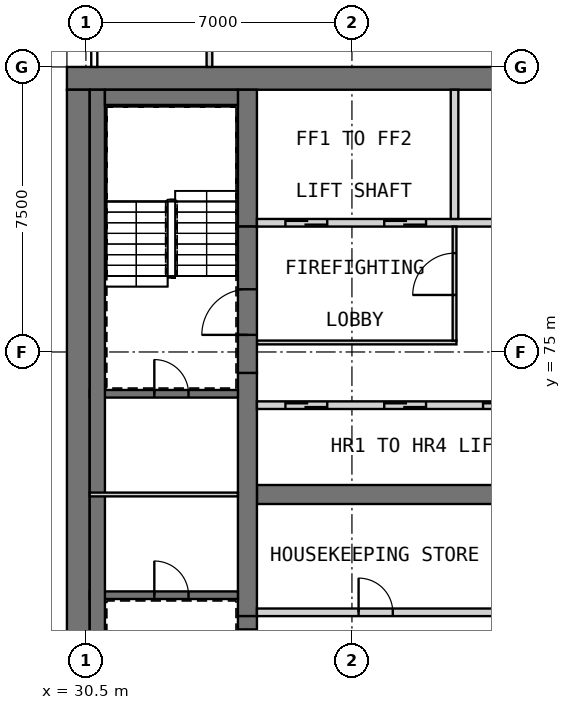
"""IFC4 building model, lengths in metres.
Left out: names, types, materials, properties, quantities, classifications, styles, units other than length and angle.
Written with IfcOpenShell. Run it as: python <this file> out.ifc"""

import sys

from ifc_helpers import new_model, si_unit, direction, frame, frame_2d, origin, place, context, subcontext, project, spatial, rectangle, extrude, element, fill, save


model = new_model("IFC4")
c1 = context("Model", 3, precision=1e-05, world=origin(), true_north=direction((0.0, 1.0)))
c2 = subcontext(c1, "Body", "Model", "MODEL_VIEW")
j1 = project(units=[si_unit("LENGTHUNIT", "METRE"), si_unit("PLANEANGLEUNIT", "RADIAN")], contexts=[c1])
p1 = place(None, origin())
s1 = spatial("IfcSite", under=j1, at=p1, CompositionType="ELEMENT")
p2 = place(p1, origin())
s2 = spatial("IfcBuilding", under=s1, at=p2, CompositionType="ELEMENT")
p3 = place(p2, frame((0.0, 0.0, 292.2)))
s3 = spatial("IfcBuildingStorey", under=s2, at=p3, CompositionType="ELEMENT", Elevation=292.2)
p4 = place(p3, frame((30.0, 82.2, 0.0), z_axis=(0.0, 0.0, 1.0), x_axis=(1.0, 0.0, 0.0)))
e1 = element("IfcWall", 1, at=p4, inside=s3, PredefinedType="SHEAR", context=c2, shape_type="SweptSolid", body=[
    extrude(rectangle(XDim=30.0, YDim=0.6, at=frame_2d((15.0, 0.0))), origin(), (0.0, 0.0, 1.0), 5.5),
])
p5 = place(p3, frame((30.3, 60.6, 0.0), z_axis=(0.0, 0.0, 1.0), x_axis=(0.0, 1.0, 0.0)))
e2 = element("IfcWall", 2, at=p5, inside=s3, PredefinedType="SHEAR", context=c2, shape_type="SweptSolid", body=[
    extrude(rectangle(XDim=21.3, YDim=0.6, at=frame_2d((10.65, 0.0))), origin(), (0.0, 0.0, 1.0), 5.5),
])
p6 = place(p3, frame((35.0, 71.25, 0.0), z_axis=(0.0, 0.0, 1.0), x_axis=(1.0, 0.0, 0.0)))
e3 = element("IfcWall", 3, at=p6, inside=s3, PredefinedType="SHEAR", context=c2, shape_type="SweptSolid", body=[
    extrude(rectangle(XDim=15.6, YDim=0.5, at=frame_2d((7.8, 0.0))), origin(), (0.0, 0.0, 1.0), 5.5),
])
p7 = place(p3, frame((34.75, 68.05, 0.0), z_axis=(0.0, 0.0, 1.0), x_axis=(0.0, 1.0, 0.0)))
e4 = element("IfcWall", 4, at=p7, inside=s3, PredefinedType="SHEAR", context=c2, shape_type="SweptSolid", body=[
    extrude(rectangle(XDim=6.4, YDim=0.5, at=frame_2d((3.2, 0.0))), origin(), (0.0, 0.0, 1.0), 5.5),
])
p8 = place(p3, frame((34.75, 78.3, 0.0), z_axis=(0.0, 0.0, 1.0), x_axis=(0.0, 1.0, 0.0)))
e5 = element("IfcWall", 5, at=p8, inside=s3, PredefinedType="SHEAR", context=c2, shape_type="SweptSolid", body=[
    extrude(rectangle(XDim=3.6, YDim=0.5, at=frame_2d((1.8, 0.0))), origin(), (0.0, 0.0, 1.0), 5.5),
])
p9 = place(p2, frame((0.0, 0.0, 34.0)))
s4 = spatial("IfcBuildingStorey", under=s2, at=p9, CompositionType="ELEMENT", Elevation=34.0)
for number, where, z_axis, x_axis in (
    (6, (29.7, 70.8, 0.0), (0.0, 0.0, 1.0), (0.0, 1.0, 0.0)),
    (7, (29.7, 75.675, 0.0), (0.0, 0.0, 1.0), (0.0, 1.0, 0.0)),
    (8, (29.7, 80.55, 0.0), (0.0, 0.0, 1.0), (0.0, 1.0, 0.0)),
):
    element("IfcWall", number, at=place(p9, frame(where, z_axis=z_axis, x_axis=x_axis)), inside=s4, PredefinedType="SOLIDWALL", context=c2, shape_type="SweptSolid", body=[
        extrude(rectangle(XDim=0.9, YDim=0.6, at=frame_2d((0.45, 0.0))), origin(), (0.0, 0.0, 1.0), 286.2),
    ])
p10 = place(p3, frame((35.0, 68.15, 0.0), z_axis=(0.0, 0.0, 1.0), x_axis=(1.0, 0.0, 0.0)))
e9 = element("IfcWall", 9, at=p10, inside=s3, PredefinedType="PARTITIONING", context=c2, shape_type="SweptSolid", body=[
    extrude(rectangle(XDim=15.6, YDim=0.2, at=frame_2d((7.8, 0.0))), origin(), (0.0, 0.0, 1.0), 5.2),
])
p11 = place(p10, frame((2.675, 0.0, 0.0)))
e10 = element("IfcOpeningElement", 10, at=p11, cuts=e9, PredefinedType="OPENING", context=c2, shape_type="SweptSolid", body=[
    extrude(rectangle(XDim=0.9, YDim=2.1, at=frame_2d((0.45, 1.05))), frame((0.0, 0.11, 0.0), z_axis=(0.0, -1.0, 0.0), x_axis=(1.0, 0.0, 0.0)), (0.0, 0.0, 1.0), 0.22),
])
p12 = place(p10, frame((10.475, 0.0, 0.0)))
e11 = element("IfcOpeningElement", 11, at=p12, cuts=e9, PredefinedType="OPENING", context=c2, shape_type="SweptSolid", body=[
    extrude(rectangle(XDim=0.9, YDim=2.1, at=frame_2d((0.45, 1.05))), frame((0.0, 0.11, 0.0), z_axis=(0.0, -1.0, 0.0), x_axis=(1.0, 0.0, 0.0)), (0.0, 0.0, 1.0), 0.22),
])
p13 = place(p3, frame((35.0, 73.6, 0.0), z_axis=(0.0, 0.0, 1.0), x_axis=(1.0, 0.0, 0.0)))
e12 = element("IfcWall", 12, at=p13, inside=s3, PredefinedType="SOLIDWALL", context=c2, shape_type="SweptSolid", body=[
    extrude(rectangle(XDim=15.6, YDim=0.2, at=frame_2d((7.8, 0.0))), origin(), (0.0, 0.0, 1.0), 5.5),
])
p14 = place(p13, frame((0.75, 0.0, 0.0)))
e13 = element("IfcOpeningElement", 13, at=p14, cuts=e12, PredefinedType="OPENING", context=c2, shape_type="SweptSolid", body=[
    extrude(rectangle(XDim=1.1, YDim=2.1, at=frame_2d((0.55, 1.05))), frame((0.0, 0.11, 0.0), z_axis=(0.0, -1.0, 0.0), x_axis=(1.0, 0.0, 0.0)), (0.0, 0.0, 1.0), 0.22),
])
p15 = place(p13, frame((3.35, 0.0, 0.0)))
e14 = element("IfcOpeningElement", 14, at=p15, cuts=e12, PredefinedType="OPENING", context=c2, shape_type="SweptSolid", body=[
    extrude(rectangle(XDim=1.1, YDim=2.1, at=frame_2d((0.55, 1.05))), frame((0.0, 0.11, 0.0), z_axis=(0.0, -1.0, 0.0), x_axis=(1.0, 0.0, 0.0)), (0.0, 0.0, 1.0), 0.22),
])
p16 = place(p13, frame((5.95, 0.0, 0.0)))
e15 = element("IfcOpeningElement", 15, at=p16, cuts=e12, PredefinedType="OPENING", context=c2, shape_type="SweptSolid", body=[
    extrude(rectangle(XDim=1.1, YDim=2.1, at=frame_2d((0.55, 1.05))), frame((0.0, 0.11, 0.0), z_axis=(0.0, -1.0, 0.0), x_axis=(1.0, 0.0, 0.0)), (0.0, 0.0, 1.0), 0.22),
])
p17 = place(p13, frame((8.55, 0.0, 0.0)))
e16 = element("IfcOpeningElement", 16, at=p17, cuts=e12, PredefinedType="OPENING", context=c2, shape_type="SweptSolid", body=[
    extrude(rectangle(XDim=1.1, YDim=2.1, at=frame_2d((0.55, 1.05))), frame((0.0, 0.11, 0.0), z_axis=(0.0, -1.0, 0.0), x_axis=(1.0, 0.0, 0.0)), (0.0, 0.0, 1.0), 0.22),
])
p18 = place(p13, frame((11.15, 0.0, 0.0)))
e17 = element("IfcOpeningElement", 17, at=p18, cuts=e12, PredefinedType="OPENING", context=c2, shape_type="SweptSolid", body=[
    extrude(rectangle(XDim=1.1, YDim=2.1, at=frame_2d((0.55, 1.05))), frame((0.0, 0.11, 0.0), z_axis=(0.0, -1.0, 0.0), x_axis=(1.0, 0.0, 0.0)), (0.0, 0.0, 1.0), 0.22),
])
p19 = place(p13, frame((13.75, 0.0, 0.0)))
e18 = element("IfcOpeningElement", 18, at=p19, cuts=e12, PredefinedType="OPENING", context=c2, shape_type="SweptSolid", body=[
    extrude(rectangle(XDim=1.1, YDim=2.1, at=frame_2d((0.55, 1.05))), frame((0.0, 0.11, 0.0), z_axis=(0.0, -1.0, 0.0), x_axis=(1.0, 0.0, 0.0)), (0.0, 0.0, 1.0), 0.22),
])
p20 = place(p3, frame((35.0, 78.4, 0.0), z_axis=(0.0, 0.0, 1.0), x_axis=(1.0, 0.0, 0.0)))
e19 = element("IfcWall", 19, at=p20, inside=s3, PredefinedType="SOLIDWALL", context=c2, shape_type="SweptSolid", body=[
    extrude(rectangle(XDim=15.6, YDim=0.2, at=frame_2d((7.8, 0.0))), origin(), (0.0, 0.0, 1.0), 5.5),
])
p21 = place(p20, frame((0.75, 0.0, 0.0)))
e20 = element("IfcOpeningElement", 20, at=p21, cuts=e19, PredefinedType="OPENING", context=c2, shape_type="SweptSolid", body=[
    extrude(rectangle(XDim=1.1, YDim=2.1, at=frame_2d((0.55, 1.05))), frame((0.0, 0.11, 0.0), z_axis=(0.0, -1.0, 0.0), x_axis=(1.0, 0.0, 0.0)), (0.0, 0.0, 1.0), 0.22),
])
p22 = place(p20, frame((3.35, 0.0, 0.0)))
e21 = element("IfcOpeningElement", 21, at=p22, cuts=e19, PredefinedType="OPENING", context=c2, shape_type="SweptSolid", body=[
    extrude(rectangle(XDim=1.1, YDim=2.1, at=frame_2d((0.55, 1.05))), frame((0.0, 0.11, 0.0), z_axis=(0.0, -1.0, 0.0), x_axis=(1.0, 0.0, 0.0)), (0.0, 0.0, 1.0), 0.22),
])
p23 = place(p20, frame((11.15, 0.0, 0.0)))
e22 = element("IfcOpeningElement", 22, at=p23, cuts=e19, PredefinedType="OPENING", context=c2, shape_type="SweptSolid", body=[
    extrude(rectangle(XDim=1.1, YDim=2.1, at=frame_2d((0.55, 1.05))), frame((0.0, 0.11, 0.0), z_axis=(0.0, -1.0, 0.0), x_axis=(1.0, 0.0, 0.0)), (0.0, 0.0, 1.0), 0.22),
])
p24 = place(p20, frame((13.75, 0.0, 0.0)))
e23 = element("IfcOpeningElement", 23, at=p24, cuts=e19, PredefinedType="OPENING", context=c2, shape_type="SweptSolid", body=[
    extrude(rectangle(XDim=1.1, YDim=2.1, at=frame_2d((0.55, 1.05))), frame((0.0, 0.11, 0.0), z_axis=(0.0, -1.0, 0.0), x_axis=(1.0, 0.0, 0.0)), (0.0, 0.0, 1.0), 0.22),
])
p25 = place(p3, frame((40.2, 78.5, 0.0), z_axis=(0.0, 0.0, 1.0), x_axis=(0.0, 1.0, 0.0)))
e24 = element("IfcWall", 24, at=p25, inside=s3, PredefinedType="SOLIDWALL", context=c2, shape_type="SweptSolid", body=[
    extrude(rectangle(XDim=3.4, YDim=0.2, at=frame_2d((1.7, 0.0))), origin(), (0.0, 0.0, 1.0), 5.5),
])
p26 = place(p3, frame((35.0, 75.25, 0.0), z_axis=(0.0, 0.0, 1.0), x_axis=(1.0, 0.0, 0.0)))
e25 = element("IfcWall", 25, at=p26, inside=s3, PredefinedType="PARTITIONING", context=c2, shape_type="SweptSolid", body=[
    extrude(rectangle(XDim=5.25, YDim=0.1, at=frame_2d((2.625, 0.0))), origin(), (0.0, 0.0, 1.0), 5.2),
])
p27 = place(p3, frame((40.2, 75.3, 0.0), z_axis=(0.0, 0.0, 1.0), x_axis=(0.0, 1.0, 0.0)))
e26 = element("IfcWall", 26, at=p27, inside=s3, PredefinedType="PARTITIONING", context=c2, shape_type="SweptSolid", body=[
    extrude(rectangle(XDim=3.0, YDim=0.1, at=frame_2d((1.5, 0.0))), origin(), (0.0, 0.0, 1.0), 5.2),
])
p28 = place(p27, frame((1.2, 0.0, 0.0)))
e27 = element("IfcOpeningElement", 27, at=p28, cuts=e26, PredefinedType="OPENING", context=c2, shape_type="SweptSolid", body=[
    extrude(rectangle(XDim=1.1, YDim=2.1, at=frame_2d((0.55, 1.05))), frame((0.0, 0.06, 0.0), z_axis=(0.0, -1.0, 0.0), x_axis=(1.0, 0.0, 0.0)), (0.0, 0.0, 1.0), 0.12),
])
p29 = place(p3, frame((34.75, 64.2, 0.0), z_axis=(0.0, 0.0, 1.0), x_axis=(0.0, 1.0, 0.0)))
e28 = element("IfcWall", 28, at=p29, inside=s3, PredefinedType="SOLIDWALL", context=c2, shape_type="SweptSolid", body=[
    extrude(rectangle(XDim=3.85, YDim=0.5, at=frame_2d((1.925, 0.0))), origin(), (0.0, 0.0, 1.0), 4.3),
])
p30 = place(p29, frame((2.3, 0.0, 0.0)))
e29 = element("IfcOpeningElement", 29, at=p30, cuts=e28, PredefinedType="OPENING", context=c2, shape_type="SweptSolid", body=[
    extrude(rectangle(XDim=1.2, YDim=2.1, at=frame_2d((0.6, 1.05))), frame((0.0, 0.26, 0.0), z_axis=(0.0, -1.0, 0.0), x_axis=(1.0, 0.0, 0.0)), (0.0, 0.0, 1.0), 0.52),
])
p31 = place(p3, frame((34.75, 74.45, 0.0), z_axis=(0.0, 0.0, 1.0), x_axis=(0.0, 1.0, 0.0)))
e30 = element("IfcWall", 30, at=p31, inside=s3, PredefinedType="SOLIDWALL", context=c2, shape_type="SweptSolid", body=[
    extrude(rectangle(XDim=3.85, YDim=0.5, at=frame_2d((1.925, 0.0))), origin(), (0.0, 0.0, 1.0), 4.3),
])
p32 = place(p31, frame((1.0, 0.0, 0.0)))
e31 = element("IfcOpeningElement", 31, at=p32, cuts=e30, PredefinedType="OPENING", context=c2, shape_type="SweptSolid", body=[
    extrude(rectangle(XDim=1.2, YDim=2.1, at=frame_2d((0.6, 1.05))), frame((0.0, 0.26, 0.0), z_axis=(0.0, -1.0, 0.0), x_axis=(1.0, 0.0, 0.0)), (0.0, 0.0, 1.0), 0.52),
])
p33 = place(p3, frame((30.6, 68.6, 0.0), z_axis=(0.0, 0.0, 1.0), x_axis=(1.0, 0.0, 0.0)))
e32 = element("IfcWall", 32, at=p33, inside=s3, PredefinedType="SOLIDWALL", context=c2, shape_type="SweptSolid", body=[
    extrude(rectangle(XDim=3.9, YDim=0.2, at=frame_2d((1.95, 0.0))), origin(), (0.0, 0.0, 1.0), 5.2),
])
p34 = place(p33, frame((1.7, 0.0, 0.0)))
e33 = element("IfcOpeningElement", 33, at=p34, cuts=e32, PredefinedType="OPENING", context=c2, shape_type="SweptSolid", body=[
    extrude(rectangle(XDim=0.9, YDim=2.1, at=frame_2d((0.45, 1.05))), frame((0.0, 0.11, 0.0), z_axis=(0.0, -1.0, 0.0), x_axis=(1.0, 0.0, 0.0)), (0.0, 0.0, 1.0), 0.22),
])
p35 = place(p3, frame((30.6, 73.9, 0.0), z_axis=(0.0, 0.0, 1.0), x_axis=(1.0, 0.0, 0.0)))
e34 = element("IfcWall", 34, at=p35, inside=s3, PredefinedType="SOLIDWALL", context=c2, shape_type="SweptSolid", body=[
    extrude(rectangle(XDim=3.9, YDim=0.2, at=frame_2d((1.95, 0.0))), origin(), (0.0, 0.0, 1.0), 5.2),
])
p36 = place(p35, frame((1.7, 0.0, 0.0)))
e35 = element("IfcOpeningElement", 35, at=p36, cuts=e34, PredefinedType="OPENING", context=c2, shape_type="SweptSolid", body=[
    extrude(rectangle(XDim=0.9, YDim=2.1, at=frame_2d((0.45, 1.05))), frame((0.0, 0.11, 0.0), z_axis=(0.0, -1.0, 0.0), x_axis=(1.0, 0.0, 0.0)), (0.0, 0.0, 1.0), 0.22),
])
p37 = place(p3, frame((30.8, 60.6, 0.0), z_axis=(0.0, 0.0, 1.0), x_axis=(0.0, 1.0, 0.0)))
e36 = element("IfcWall", 36, at=p37, inside=s3, PredefinedType="SOLIDWALL", context=c2, shape_type="SweptSolid", body=[
    extrude(rectangle(XDim=21.3, YDim=0.4, at=frame_2d((10.65, 0.0))), origin(), (0.0, 0.0, 1.0), 5.2),
])
p38 = place(p3, frame((31.0, 81.7, 0.0), z_axis=(0.0, 0.0, 1.0), x_axis=(1.0, 0.0, 0.0)))
e37 = element("IfcWall", 37, at=p38, inside=s3, PredefinedType="SOLIDWALL", context=c2, shape_type="SweptSolid", body=[
    extrude(rectangle(XDim=3.5, YDim=0.4, at=frame_2d((1.75, 0.0))), origin(), (0.0, 0.0, 1.0), 5.2),
])
p39 = place(p3, frame((30.6, 71.25, 0.0), z_axis=(0.0, 0.0, 1.0), x_axis=(1.0, 0.0, 0.0)))
e38 = element("IfcWall", 38, at=p39, inside=s3, PredefinedType="PARTITIONING", context=c2, shape_type="SweptSolid", body=[
    extrude(rectangle(XDim=3.9, YDim=0.1, at=frame_2d((1.95, 0.0))), origin(), (0.0, 0.0, 1.0), 5.2),
])
p40 = place(p3, frame((33.75, 82.5, 0.0), z_axis=(0.0, 0.0, 1.0), x_axis=(0.0, 1.0, 0.0)))
e39 = element("IfcWall", 39, at=p40, inside=s3, PredefinedType="PARTITIONING", context=c2, shape_type="SweptSolid", body=[
    extrude(rectangle(XDim=1.725, YDim=0.15, at=frame_2d((0.863, 0.0))), origin(), (0.0, 0.0, 1.0), 5.2),
])
p41 = place(p11, origin())
e40 = element("IfcDoor", 40, at=p41, inside=s3, OperationType="SINGLE_SWING_LEFT", PredefinedType="DOOR", context=c2, shape_type="SweptSolid", body=[
    extrude(rectangle(XDim=0.9, YDim=2.1, at=frame_2d((0.45, 1.05))), frame((0.0, 0.025, 0.0), z_axis=(0.0, -1.0, 0.0), x_axis=(1.0, 0.0, 0.0)), (0.0, 0.0, 1.0), 0.05),
])
fill(e10, e40)
p42 = place(p14, origin())
e41 = element("IfcDoor", 41, at=p42, inside=s3, OperationType="DOUBLE_DOOR_SLIDING", PredefinedType="DOOR", context=c2, shape_type="SweptSolid", body=[
    extrude(rectangle(XDim=1.1, YDim=2.1, at=frame_2d((0.55, 1.05))), frame((0.0, 0.025, 0.0), z_axis=(0.0, -1.0, 0.0), x_axis=(1.0, 0.0, 0.0)), (0.0, 0.0, 1.0), 0.05),
])
fill(e13, e41)
p43 = place(p15, origin())
e42 = element("IfcDoor", 42, at=p43, inside=s3, OperationType="DOUBLE_DOOR_SLIDING", PredefinedType="DOOR", context=c2, shape_type="SweptSolid", body=[
    extrude(rectangle(XDim=1.1, YDim=2.1, at=frame_2d((0.55, 1.05))), frame((0.0, 0.025, 0.0), z_axis=(0.0, -1.0, 0.0), x_axis=(1.0, 0.0, 0.0)), (0.0, 0.0, 1.0), 0.05),
])
fill(e14, e42)
p44 = place(p16, origin())
e43 = element("IfcDoor", 43, at=p44, inside=s3, OperationType="DOUBLE_DOOR_SLIDING", PredefinedType="DOOR", context=c2, shape_type="SweptSolid", body=[
    extrude(rectangle(XDim=1.1, YDim=2.1, at=frame_2d((0.55, 1.05))), frame((0.0, 0.025, 0.0), z_axis=(0.0, -1.0, 0.0), x_axis=(1.0, 0.0, 0.0)), (0.0, 0.0, 1.0), 0.05),
])
fill(e15, e43)
p45 = place(p21, origin())
e44 = element("IfcDoor", 44, at=p45, inside=s3, OperationType="DOUBLE_DOOR_SLIDING", PredefinedType="DOOR", context=c2, shape_type="SweptSolid", body=[
    extrude(rectangle(XDim=1.1, YDim=2.1, at=frame_2d((0.55, 1.05))), frame((0.0, 0.025, 0.0), z_axis=(0.0, -1.0, 0.0), x_axis=(1.0, 0.0, 0.0)), (0.0, 0.0, 1.0), 0.05),
])
fill(e20, e44)
p46 = place(p22, origin())
e45 = element("IfcDoor", 45, at=p46, inside=s3, OperationType="DOUBLE_DOOR_SLIDING", PredefinedType="DOOR", context=c2, shape_type="SweptSolid", body=[
    extrude(rectangle(XDim=1.1, YDim=2.1, at=frame_2d((0.55, 1.05))), frame((0.0, 0.025, 0.0), z_axis=(0.0, -1.0, 0.0), x_axis=(1.0, 0.0, 0.0)), (0.0, 0.0, 1.0), 0.05),
])
fill(e21, e45)
p47 = place(p28, origin())
e46 = element("IfcDoor", 46, at=p47, inside=s3, OperationType="SINGLE_SWING_LEFT", PredefinedType="DOOR", context=c2, shape_type="SweptSolid", body=[
    extrude(rectangle(XDim=1.1, YDim=2.1, at=frame_2d((0.55, 1.05))), frame((0.0, 0.025, 0.0), z_axis=(0.0, -1.0, 0.0), x_axis=(1.0, 0.0, 0.0)), (0.0, 0.0, 1.0), 0.05),
])
fill(e27, e46)
p48 = place(p30, origin())
e47 = element("IfcDoor", 47, at=p48, inside=s3, OperationType="SINGLE_SWING_LEFT", PredefinedType="DOOR", context=c2, shape_type="SweptSolid", body=[
    extrude(rectangle(XDim=1.2, YDim=2.1, at=frame_2d((0.6, 1.05))), frame((0.0, 0.025, 0.0), z_axis=(0.0, -1.0, 0.0), x_axis=(1.0, 0.0, 0.0)), (0.0, 0.0, 1.0), 0.05),
])
fill(e29, e47)
p49 = place(p32, origin())
e48 = element("IfcDoor", 48, at=p49, inside=s3, OperationType="SINGLE_SWING_RIGHT", PredefinedType="DOOR", context=c2, shape_type="SweptSolid", body=[
    extrude(rectangle(XDim=1.2, YDim=2.1, at=frame_2d((0.6, 1.05))), frame((0.0, 0.025, 0.0), z_axis=(0.0, -1.0, 0.0), x_axis=(1.0, 0.0, 0.0)), (0.0, 0.0, 1.0), 0.05),
])
fill(e31, e48)
p50 = place(p34, origin())
e49 = element("IfcDoor", 49, at=p50, inside=s3, OperationType="SINGLE_SWING_LEFT", PredefinedType="DOOR", context=c2, shape_type="SweptSolid", body=[
    extrude(rectangle(XDim=0.9, YDim=2.1, at=frame_2d((0.45, 1.05))), frame((0.0, 0.025, 0.0), z_axis=(0.0, -1.0, 0.0), x_axis=(1.0, 0.0, 0.0)), (0.0, 0.0, 1.0), 0.05),
])
fill(e33, e49)
p51 = place(p36, origin())
e50 = element("IfcDoor", 50, at=p51, inside=s3, OperationType="SINGLE_SWING_RIGHT", PredefinedType="DOOR", context=c2, shape_type="SweptSolid", body=[
    extrude(rectangle(XDim=0.9, YDim=2.1, at=frame_2d((0.45, 1.05))), frame((0.0, 0.025, 0.0), z_axis=(0.0, -1.0, 0.0), x_axis=(1.0, 0.0, 0.0)), (0.0, 0.0, 1.0), 0.05),
])
fill(e35, e50)
save(model, sys.argv[1])
